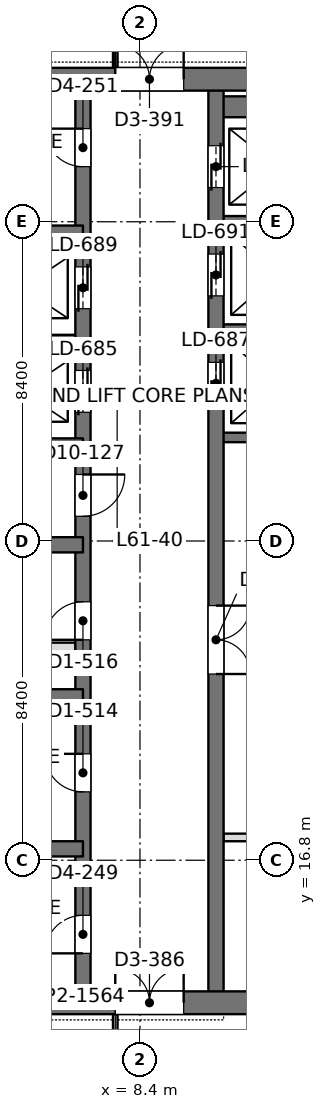
"""IFC4 building model, lengths in metres.
Left out: names, types, materials, properties, quantities, classifications, styles, units other than length and angle.
Written with IfcOpenShell. Run it as: python <this file> out.ifc"""

import sys

from ifc_helpers import new_model, si_unit, direction, frame, frame_2d, origin, place, context, subcontext, project, spatial, rectangle, extrude, element, fill, save


model = new_model("IFC4")
c1 = context("Model", 3, precision=1e-05, world=origin(), true_north=direction((0.0, 1.0)))
c2 = subcontext(c1, "Body", "Model", "MODEL_VIEW")
j1 = project(units=[si_unit("LENGTHUNIT", "METRE"), si_unit("PLANEANGLEUNIT", "RADIAN")], contexts=[c1])
p1 = place(None, origin())
s1 = spatial("IfcSite", under=j1, at=p1, CompositionType="ELEMENT")
p2 = place(p1, origin())
s2 = spatial("IfcBuilding", under=s1, at=p2, CompositionType="ELEMENT")
p3 = place(p2, frame((0.0, 0.0, 268.2)))
s3 = spatial("IfcBuildingStorey", under=s2, at=p3, CompositionType="ELEMENT", Elevation=268.2)
p4 = place(p3, frame((-1.05, 13.05, 0.0), z_axis=(0.0, 0.0, 1.0), x_axis=(1.0, 0.0, 0.0)))
e1 = element("IfcWall", 1, at=p4, inside=s3, PredefinedType="SHEAR", context=c2, shape_type="SweptSolid", body=[
    extrude(rectangle(XDim=17.7, YDim=0.6, at=frame_2d((8.85, 0.0))), origin(), (0.0, 0.0, 1.0), 4.5),
])
p5 = place(p4, frame((8.8, 0.0, 0.0)))
e2 = element("IfcOpeningElement", 2, at=p5, cuts=e1, PredefinedType="OPENING", context=c2, shape_type="SweptSolid", body=[
    extrude(rectangle(XDim=1.8, YDim=2.4, at=frame_2d((0.9, 1.2))), frame((0.0, 0.31, 0.0), z_axis=(0.0, -1.0, 0.0), x_axis=(1.0, 0.0, 0.0)), (0.0, 0.0, 1.0), 0.62),
])
p6 = place(p3, frame((-1.05, 37.35, 0.0), z_axis=(0.0, 0.0, 1.0), x_axis=(1.0, 0.0, 0.0)))
e3 = element("IfcWall", 3, at=p6, inside=s3, PredefinedType="SHEAR", context=c2, shape_type="SweptSolid", body=[
    extrude(rectangle(XDim=17.7, YDim=0.6, at=frame_2d((8.85, 0.0))), origin(), (0.0, 0.0, 1.0), 4.5),
])
p7 = place(p6, frame((8.8, 0.0, 0.0)))
e4 = element("IfcOpeningElement", 4, at=p7, cuts=e3, PredefinedType="OPENING", context=c2, shape_type="SweptSolid", body=[
    extrude(rectangle(XDim=1.8, YDim=2.4, at=frame_2d((0.9, 1.2))), frame((0.0, 0.31, 0.0), z_axis=(0.0, -1.0, 0.0), x_axis=(1.0, 0.0, 0.0)), (0.0, 0.0, 1.0), 0.62),
])
p8 = place(p3, frame((6.9, 13.05, 0.0), z_axis=(0.0, 0.0, 1.0), x_axis=(0.0, 1.0, 0.0)))
e5 = element("IfcWall", 5, at=p8, inside=s3, PredefinedType="SHEAR", context=c2, shape_type="SweptSolid", body=[
    extrude(rectangle(XDim=24.3, YDim=0.4, at=frame_2d((12.15, 0.0))), origin(), (0.0, 0.0, 1.0), 4.5),
])
p9 = place(p8, frame((1.3, 0.0, 0.0)))
e6 = element("IfcOpeningElement", 6, at=p9, cuts=e5, PredefinedType="OPENING", context=c2, shape_type="SweptSolid", body=[
    extrude(rectangle(XDim=1.0, YDim=2.2, at=frame_2d((0.5, 1.1))), frame((0.0, 0.21, 0.0), z_axis=(0.0, -1.0, 0.0), x_axis=(1.0, 0.0, 0.0)), (0.0, 0.0, 1.0), 0.42),
])
p10 = place(p8, frame((22.0, 0.0, 0.0)))
e7 = element("IfcOpeningElement", 7, at=p10, cuts=e5, PredefinedType="OPENING", context=c2, shape_type="SweptSolid", body=[
    extrude(rectangle(XDim=1.0, YDim=2.2, at=frame_2d((0.5, 1.1))), frame((0.0, 0.21, 0.0), z_axis=(0.0, -1.0, 0.0), x_axis=(1.0, 0.0, 0.0)), (0.0, 0.0, 1.0), 0.42),
])
p11 = place(p8, frame((5.55, 0.0, 0.0)))
e8 = element("IfcOpeningElement", 8, at=p11, cuts=e5, PredefinedType="OPENING", context=c2, shape_type="SweptSolid", body=[
    extrude(rectangle(XDim=1.0, YDim=2.2, at=frame_2d((0.5, 1.1))), frame((0.0, 0.21, 0.0), z_axis=(0.0, -1.0, 0.0), x_axis=(1.0, 0.0, 0.0)), (0.0, 0.0, 1.0), 0.42),
])
p12 = place(p8, frame((9.55, 0.0, 0.0)))
e9 = element("IfcOpeningElement", 9, at=p12, cuts=e5, PredefinedType="OPENING", context=c2, shape_type="SweptSolid", body=[
    extrude(rectangle(XDim=1.0, YDim=2.2, at=frame_2d((0.5, 1.1))), frame((0.0, 0.21, 0.0), z_axis=(0.0, -1.0, 0.0), x_axis=(1.0, 0.0, 0.0)), (0.0, 0.0, 1.0), 0.42),
])
p13 = place(p8, frame((12.8, 0.0, 0.0)))
e10 = element("IfcOpeningElement", 10, at=p13, cuts=e5, PredefinedType="OPENING", context=c2, shape_type="SweptSolid", body=[
    extrude(rectangle(XDim=1.1, YDim=2.2, at=frame_2d((0.55, 1.1))), frame((0.0, 0.21, 0.0), z_axis=(0.0, -1.0, 0.0), x_axis=(1.0, 0.0, 0.0)), (0.0, 0.0, 1.0), 0.42),
])
p14 = place(p8, frame((15.538, 0.0, 0.0)))
e11 = element("IfcOpeningElement", 11, at=p14, cuts=e5, PredefinedType="OPENING", context=c2, shape_type="SweptSolid", body=[
    extrude(rectangle(XDim=1.1, YDim=2.2, at=frame_2d((0.55, 1.1))), frame((0.0, 0.21, 0.0), z_axis=(0.0, -1.0, 0.0), x_axis=(1.0, 0.0, 0.0)), (0.0, 0.0, 1.0), 0.42),
])
p15 = place(p8, frame((18.262, 0.0, 0.0)))
e12 = element("IfcOpeningElement", 12, at=p15, cuts=e5, PredefinedType="OPENING", context=c2, shape_type="SweptSolid", body=[
    extrude(rectangle(XDim=1.1, YDim=2.2, at=frame_2d((0.55, 1.1))), frame((0.0, 0.21, 0.0), z_axis=(0.0, -1.0, 0.0), x_axis=(1.0, 0.0, 0.0)), (0.0, 0.0, 1.0), 0.42),
])
p16 = place(p3, frame((10.4, 13.05, 0.0), z_axis=(0.0, 0.0, 1.0), x_axis=(0.0, 1.0, 0.0)))
e13 = element("IfcWall", 13, at=p16, inside=s3, PredefinedType="SHEAR", context=c2, shape_type="SweptSolid", body=[
    extrude(rectangle(XDim=24.3, YDim=0.4, at=frame_2d((12.15, 0.0))), origin(), (0.0, 0.0, 1.0), 4.5),
])
p17 = place(p16, frame((15.75, 0.0, 0.0)))
e14 = element("IfcOpeningElement", 14, at=p17, cuts=e13, PredefinedType="OPENING", context=c2, shape_type="SweptSolid", body=[
    extrude(rectangle(XDim=1.1, YDim=2.2, at=frame_2d((0.55, 1.1))), frame((0.0, 0.21, 0.0), z_axis=(0.0, -1.0, 0.0), x_axis=(1.0, 0.0, 0.0)), (0.0, 0.0, 1.0), 0.42),
])
p18 = place(p16, frame((18.6, 0.0, 0.0)))
e15 = element("IfcOpeningElement", 15, at=p18, cuts=e13, PredefinedType="OPENING", context=c2, shape_type="SweptSolid", body=[
    extrude(rectangle(XDim=1.1, YDim=2.2, at=frame_2d((0.55, 1.1))), frame((0.0, 0.21, 0.0), z_axis=(0.0, -1.0, 0.0), x_axis=(1.0, 0.0, 0.0)), (0.0, 0.0, 1.0), 0.42),
])
p19 = place(p16, frame((21.45, 0.0, 0.0)))
e16 = element("IfcOpeningElement", 16, at=p19, cuts=e13, PredefinedType="OPENING", context=c2, shape_type="SweptSolid", body=[
    extrude(rectangle(XDim=1.1, YDim=2.2, at=frame_2d((0.55, 1.1))), frame((0.0, 0.21, 0.0), z_axis=(0.0, -1.0, 0.0), x_axis=(1.0, 0.0, 0.0)), (0.0, 0.0, 1.0), 0.42),
])
p20 = place(p16, frame((8.65, 0.0, 0.0)))
e17 = element("IfcOpeningElement", 17, at=p20, cuts=e13, PredefinedType="OPENING", context=c2, shape_type="SweptSolid", body=[
    extrude(rectangle(XDim=1.8, YDim=2.4, at=frame_2d((0.9, 1.2))), frame((0.0, 0.21, 0.0), z_axis=(0.0, -1.0, 0.0), x_axis=(1.0, 0.0, 0.0)), (0.0, 0.0, 1.0), 0.42),
])
for number, where, z_axis, x_axis in (
    (18, (-0.75, 17.1, 0.0), (0.0, 0.0, 1.0), (1.0, 0.0, 0.0)),
    (19, (-0.75, 21.1, 0.0), (0.0, 0.0, 1.0), (1.0, 0.0, 0.0)),
    (20, (-0.75, 25.1, 0.0), (0.0, 0.0, 1.0), (1.0, 0.0, 0.0)),
    (21, (-0.75, 27.7, 0.0), (0.0, 0.0, 1.0), (1.0, 0.0, 0.0)),
    (22, (-0.75, 33.3, 0.0), (0.0, 0.0, 1.0), (1.0, 0.0, 0.0)),
):
    element("IfcWall", number, at=place(p3, frame(where, z_axis=z_axis, x_axis=x_axis)), inside=s3, PredefinedType="SHEAR", context=c2, shape_type="SweptSolid", body=[
        extrude(rectangle(XDim=7.65, YDim=0.4, at=frame_2d((3.825, 0.0))), origin(), (0.0, 0.0, 1.0), 4.5),
    ])
p21 = place(p3, frame((3.7, 30.5, 0.0), z_axis=(0.0, 0.0, 1.0), x_axis=(1.0, 0.0, 0.0)))
e23 = element("IfcWall", 23, at=p21, inside=s3, PredefinedType="SHEAR", context=c2, shape_type="SweptSolid", body=[
    extrude(rectangle(XDim=3.2, YDim=0.25, at=frame_2d((1.6, 0.0))), origin(), (0.0, 0.0, 1.0), 4.5),
])
p22 = place(p3, frame((10.4, 27.925, 0.0), z_axis=(0.0, 0.0, 1.0), x_axis=(1.0, 0.0, 0.0)))
e24 = element("IfcWall", 24, at=p22, inside=s3, PredefinedType="SHEAR", context=c2, shape_type="SweptSolid", body=[
    extrude(rectangle(XDim=5.95, YDim=0.25, at=frame_2d((2.975, 0.0))), origin(), (0.0, 0.0, 1.0), 4.5),
])
for number, where, z_axis, x_axis in (
    (25, (10.4, 30.775, 0.0), (0.0, 0.0, 1.0), (1.0, 0.0, 0.0)),
    (26, (10.4, 33.625, 0.0), (0.0, 0.0, 1.0), (1.0, 0.0, 0.0)),
):
    element("IfcWall", number, at=place(p3, frame(where, z_axis=z_axis, x_axis=x_axis)), inside=s3, PredefinedType="SHEAR", context=c2, shape_type="SweptSolid", body=[
        extrude(rectangle(XDim=3.2, YDim=0.25, at=frame_2d((1.6, 0.0))), origin(), (0.0, 0.0, 1.0), 4.5),
    ])
p23 = place(p3, frame((10.4, 36.625, 0.0), z_axis=(0.0, 0.0, 1.0), x_axis=(1.0, 0.0, 0.0)))
e27 = element("IfcWall", 27, at=p23, inside=s3, PredefinedType="SHEAR", context=c2, shape_type="SweptSolid", body=[
    extrude(rectangle(XDim=3.2, YDim=0.55, at=frame_2d((1.6, 0.0))), origin(), (0.0, 0.0, 1.0), 4.5),
])
p24 = place(p3, frame((10.598, 17.4, 0.0), z_axis=(0.0, 0.0, 1.0), x_axis=(1.0, 0.0, 0.0)))
e28 = element("IfcWall", 28, at=p24, inside=s3, PredefinedType="PARTITIONING", context=c2, shape_type="SweptSolid", body=[
    extrude(rectangle(XDim=5.904, YDim=0.2, at=frame_2d((2.952, 0.0))), origin(), (0.0, 0.0, 1.0), 3.8),
])
p25 = place(p3, frame((7.75, 10.898, 0.0), z_axis=(0.0, 0.0, 1.0), x_axis=(0.0, 1.0, 0.0)))
e29 = element("IfcWall", 29, at=p25, inside=s3, PredefinedType="PARTITIONING", context=c2, shape_type="SweptSolid", body=[
    extrude(rectangle(XDim=1.854, YDim=0.12, at=frame_2d((0.927, 0.0))), origin(), (0.0, 0.0, 1.0), 4.35),
])
p26 = place(p25, frame((0.252, 0.0, 0.0)))
e30 = element("IfcOpeningElement", 30, at=p26, cuts=e29, PredefinedType="OPENING", context=c2, shape_type="SweptSolid", body=[
    extrude(rectangle(XDim=1.1, YDim=2.4, at=frame_2d((0.55, 1.2))), frame((0.0, 0.07, 0.0), z_axis=(0.0, -1.0, 0.0), x_axis=(1.0, 0.0, 0.0)), (0.0, 0.0, 1.0), 0.14),
])
p27 = place(p3, frame((7.75, 37.648, 0.0), z_axis=(0.0, 0.0, 1.0), x_axis=(0.0, 1.0, 0.0)))
e31 = element("IfcWall", 31, at=p27, inside=s3, PredefinedType="PARTITIONING", context=c2, shape_type="SweptSolid", body=[
    extrude(rectangle(XDim=1.854, YDim=0.12, at=frame_2d((0.927, 0.0))), origin(), (0.0, 0.0, 1.0), 4.35),
])
p28 = place(p27, frame((0.502, 0.0, 0.0)))
e32 = element("IfcOpeningElement", 32, at=p28, cuts=e31, PredefinedType="OPENING", context=c2, shape_type="SweptSolid", body=[
    extrude(rectangle(XDim=1.1, YDim=2.4, at=frame_2d((0.55, 1.2))), frame((0.0, 0.07, 0.0), z_axis=(0.0, -1.0, 0.0), x_axis=(1.0, 0.0, 0.0)), (0.0, 0.0, 1.0), 0.14),
])
p29 = place(p3, frame((-0.05, 22.4, 0.0), z_axis=(0.0, 0.0, 1.0), x_axis=(1.0, 0.0, 0.0)))
e33 = element("IfcWall", 33, at=p29, inside=s3, PredefinedType="PARTITIONING", context=c2, shape_type="SweptSolid", body=[
    extrude(rectangle(XDim=6.75, YDim=0.25, at=frame_2d((3.375, 0.0))), origin(), (0.0, 0.0, 1.0), 4.3),
])
p30 = place(p29, frame((2.95, 0.0, 0.0)))
e34 = element("IfcOpeningElement", 34, at=p30, cuts=e33, PredefinedType="OPENING", context=c2, shape_type="SweptSolid", body=[
    extrude(rectangle(XDim=0.9, YDim=2.2, at=frame_2d((0.45, 1.1))), frame((0.0, 0.135, 0.0), z_axis=(0.0, -1.0, 0.0), x_axis=(1.0, 0.0, 0.0)), (0.0, 0.0, 1.0), 0.27),
])
p31 = place(p5, origin())
e35 = element("IfcDoor", 35, at=p31, inside=s3, OperationType="DOUBLE_DOOR_SINGLE_SWING", PredefinedType="DOOR", context=c2, shape_type="SweptSolid", body=[
    extrude(rectangle(XDim=1.8, YDim=2.4, at=frame_2d((0.9, 1.2))), frame((0.0, 0.025, 0.0), z_axis=(0.0, -1.0, 0.0), x_axis=(1.0, 0.0, 0.0)), (0.0, 0.0, 1.0), 0.05),
])
fill(e2, e35)
p32 = place(p7, origin())
e36 = element("IfcDoor", 36, at=p32, inside=s3, OperationType="DOUBLE_DOOR_SINGLE_SWING", PredefinedType="DOOR", context=c2, shape_type="SweptSolid", body=[
    extrude(rectangle(XDim=1.8, YDim=2.4, at=frame_2d((0.9, 1.2))), frame((0.0, 0.025, 0.0), z_axis=(0.0, -1.0, 0.0), x_axis=(1.0, 0.0, 0.0)), (0.0, 0.0, 1.0), 0.05),
])
fill(e4, e36)
p33 = place(p9, origin())
e37 = element("IfcDoor", 37, at=p33, inside=s3, OperationType="SINGLE_SWING_LEFT", PredefinedType="DOOR", context=c2, shape_type="SweptSolid", body=[
    extrude(rectangle(XDim=1.0, YDim=2.2, at=frame_2d((0.5, 1.1))), frame((0.0, 0.025, 0.0), z_axis=(0.0, -1.0, 0.0), x_axis=(1.0, 0.0, 0.0)), (0.0, 0.0, 1.0), 0.05),
])
fill(e6, e37)
p34 = place(p10, origin())
e38 = element("IfcDoor", 38, at=p34, inside=s3, OperationType="SINGLE_SWING_RIGHT", PredefinedType="DOOR", context=c2, shape_type="SweptSolid", body=[
    extrude(rectangle(XDim=1.0, YDim=2.2, at=frame_2d((0.5, 1.1))), frame((0.0, 0.025, 0.0), z_axis=(0.0, -1.0, 0.0), x_axis=(1.0, 0.0, 0.0)), (0.0, 0.0, 1.0), 0.05),
])
fill(e7, e38)
p35 = place(p11, origin())
e39 = element("IfcDoor", 39, at=p35, inside=s3, OperationType="SINGLE_SWING_RIGHT", PredefinedType="DOOR", context=c2, shape_type="SweptSolid", body=[
    extrude(rectangle(XDim=1.0, YDim=2.2, at=frame_2d((0.5, 1.1))), frame((0.0, 0.025, 0.0), z_axis=(0.0, -1.0, 0.0), x_axis=(1.0, 0.0, 0.0)), (0.0, 0.0, 1.0), 0.05),
])
fill(e8, e39)
p36 = place(p12, origin())
e40 = element("IfcDoor", 40, at=p36, inside=s3, OperationType="SINGLE_SWING_LEFT", PredefinedType="DOOR", context=c2, shape_type="SweptSolid", body=[
    extrude(rectangle(XDim=1.0, YDim=2.2, at=frame_2d((0.5, 1.1))), frame((0.0, 0.025, 0.0), z_axis=(0.0, -1.0, 0.0), x_axis=(1.0, 0.0, 0.0)), (0.0, 0.0, 1.0), 0.05),
])
fill(e9, e40)
p37 = place(p13, frame((1.1, 0.0, 0.0), z_axis=(0.0, 0.0, 1.0), x_axis=(-1.0, 0.0, 0.0)))
e41 = element("IfcDoor", 41, at=p37, inside=s3, OperationType="SINGLE_SWING_LEFT", PredefinedType="DOOR", context=c2, shape_type="SweptSolid", body=[
    extrude(rectangle(XDim=1.1, YDim=2.2, at=frame_2d((0.55, 1.1))), frame((0.0, 0.025, 0.0), z_axis=(0.0, -1.0, 0.0), x_axis=(1.0, 0.0, 0.0)), (0.0, 0.0, 1.0), 0.05),
])
fill(e10, e41)
p38 = place(p17, origin())
e42 = element("IfcDoor", 42, at=p38, inside=s3, OperationType="DOUBLE_DOOR_SLIDING", PredefinedType="DOOR", context=c2, shape_type="SweptSolid", body=[
    extrude(rectangle(XDim=1.1, YDim=2.2, at=frame_2d((0.55, 1.1))), frame((0.0, 0.025, 0.0), z_axis=(0.0, -1.0, 0.0), x_axis=(1.0, 0.0, 0.0)), (0.0, 0.0, 1.0), 0.05),
])
fill(e14, e42)
p39 = place(p18, origin())
e43 = element("IfcDoor", 43, at=p39, inside=s3, OperationType="DOUBLE_DOOR_SLIDING", PredefinedType="DOOR", context=c2, shape_type="SweptSolid", body=[
    extrude(rectangle(XDim=1.1, YDim=2.2, at=frame_2d((0.55, 1.1))), frame((0.0, 0.025, 0.0), z_axis=(0.0, -1.0, 0.0), x_axis=(1.0, 0.0, 0.0)), (0.0, 0.0, 1.0), 0.05),
])
fill(e15, e43)
p40 = place(p19, origin())
e44 = element("IfcDoor", 44, at=p40, inside=s3, OperationType="DOUBLE_DOOR_SLIDING", PredefinedType="DOOR", context=c2, shape_type="SweptSolid", body=[
    extrude(rectangle(XDim=1.1, YDim=2.2, at=frame_2d((0.55, 1.1))), frame((0.0, 0.025, 0.0), z_axis=(0.0, -1.0, 0.0), x_axis=(1.0, 0.0, 0.0)), (0.0, 0.0, 1.0), 0.05),
])
fill(e16, e44)
p41 = place(p14, origin())
e45 = element("IfcDoor", 45, at=p41, inside=s3, OperationType="DOUBLE_DOOR_SLIDING", PredefinedType="DOOR", context=c2, shape_type="SweptSolid", body=[
    extrude(rectangle(XDim=1.1, YDim=2.2, at=frame_2d((0.55, 1.1))), frame((0.0, 0.025, 0.0), z_axis=(0.0, -1.0, 0.0), x_axis=(1.0, 0.0, 0.0)), (0.0, 0.0, 1.0), 0.05),
])
fill(e11, e45)
p42 = place(p15, origin())
e46 = element("IfcDoor", 46, at=p42, inside=s3, OperationType="DOUBLE_DOOR_SLIDING", PredefinedType="DOOR", context=c2, shape_type="SweptSolid", body=[
    extrude(rectangle(XDim=1.1, YDim=2.2, at=frame_2d((0.55, 1.1))), frame((0.0, 0.025, 0.0), z_axis=(0.0, -1.0, 0.0), x_axis=(1.0, 0.0, 0.0)), (0.0, 0.0, 1.0), 0.05),
])
fill(e12, e46)
p43 = place(p20, frame((1.8, 0.0, 0.0), z_axis=(0.0, 0.0, 1.0), x_axis=(-1.0, 0.0, 0.0)))
e47 = element("IfcDoor", 47, at=p43, inside=s3, OperationType="DOUBLE_DOOR_SINGLE_SWING", PredefinedType="DOOR", context=c2, shape_type="SweptSolid", body=[
    extrude(rectangle(XDim=1.8, YDim=2.4, at=frame_2d((0.9, 1.2))), frame((0.0, 0.025, 0.0), z_axis=(0.0, -1.0, 0.0), x_axis=(1.0, 0.0, 0.0)), (0.0, 0.0, 1.0), 0.05),
])
fill(e17, e47)
save(model, sys.argv[1])
